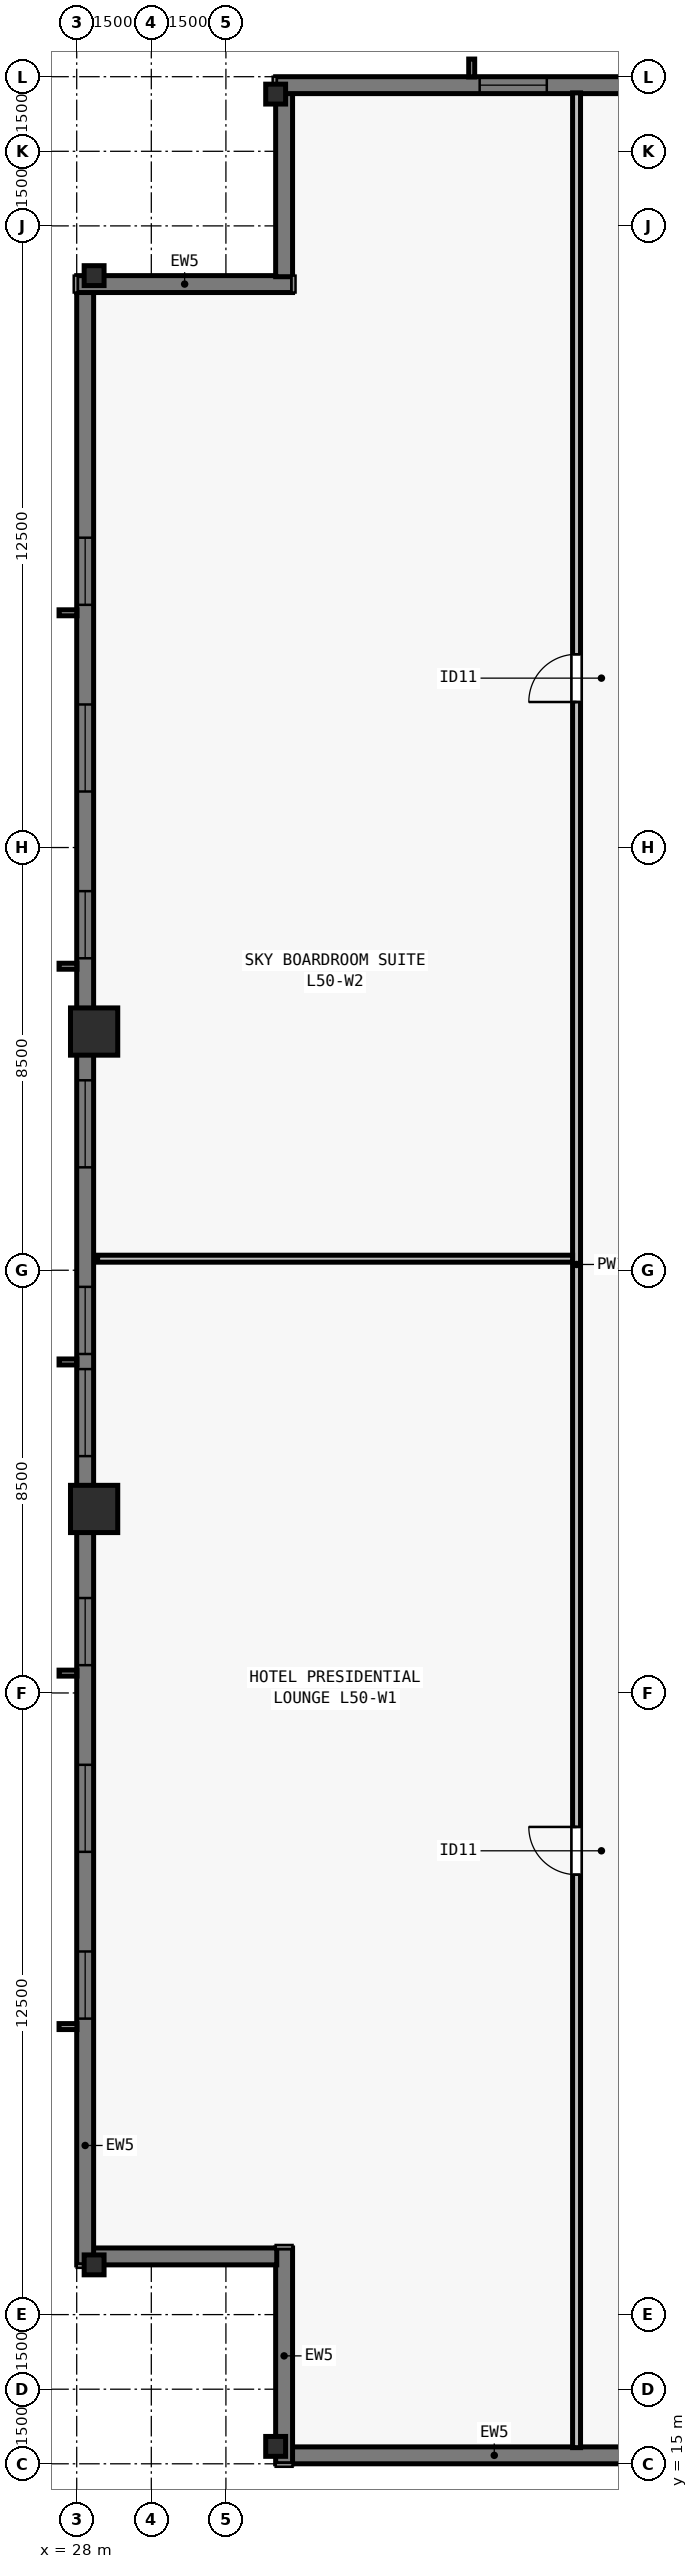
"""IFC4 building model, lengths in metres.
Left out: names, types, materials, properties, quantities, classifications, styles, units other than length and angle.
Written with IfcOpenShell. Run it as: python <this file> out.ifc"""

import sys

from ifc_helpers import new_model, si_unit, direction, frame, frame_2d, origin, origin_2d, place, context, subcontext, project, spatial, rectangle, i_section, extrude, element, fill, save


model = new_model("IFC4")
c1 = context("Model", 3, precision=1e-05, world=origin(), true_north=direction((0.0, 1.0)))
c2 = subcontext(c1, "Body", "Model", "MODEL_VIEW")
j1 = project(units=[si_unit("LENGTHUNIT", "METRE"), si_unit("PLANEANGLEUNIT", "RADIAN")], contexts=[c1])
p1 = place(None, origin())
s1 = spatial("IfcSite", under=j1, at=p1, CompositionType="ELEMENT")
p2 = place(p1, origin())
s2 = spatial("IfcBuilding", under=s1, at=p2, CompositionType="ELEMENT")
p3 = place(p2, frame((0.0, 0.0, 183.0)))
s3 = spatial("IfcBuildingStorey", under=s2, at=p3, CompositionType="ELEMENT", Elevation=183.0)
for number, where, z_axis, x_axis in (
    (1, (32.0, 15.35, 0.0), (0.0, 0.0, 1.0), (1.0, 0.0, 0.0)),
    (2, (32.0, 62.65, 0.0), (0.0, 0.0, 1.0), (1.0, 0.0, 0.0)),
    (3, (28.35, 59.0, 0.0), (0.0, 0.0, 1.0), (0.0, 1.0, 0.0)),
):
    element("IfcColumn", number, at=place(p3, frame(where, z_axis=z_axis, x_axis=x_axis)), inside=s3, PredefinedType="COLUMN", context=c2, shape_type="SweptSolid", body=[
        extrude(i_section(OverallWidth=0.4, OverallDepth=0.4, WebThickness=0.022, FlangeThickness=0.036, at=origin_2d()), origin(), (0.0, 0.0, 1.0), 3.5),
    ])
for number, where, z_axis, x_axis in (
    (4, (28.35, 43.8, 0.0), (0.0, 0.0, 1.0), (0.0, 1.0, 0.0)),
    (5, (28.35, 34.2, 0.0), (0.0, 0.0, 1.0), (0.0, 1.0, 0.0)),
):
    element("IfcColumn", number, at=place(p3, frame(where, z_axis=z_axis, x_axis=x_axis)), inside=s3, PredefinedType="COLUMN", context=c2, shape_type="SweptSolid", body=[
        extrude(rectangle(XDim=0.95, YDim=0.95, at=origin_2d()), origin(), (0.0, 0.0, 1.0), 3.5),
    ])
p4 = place(p3, frame((28.35, 19.0, 0.0), z_axis=(0.0, 0.0, 1.0), x_axis=(0.0, 1.0, 0.0)))
e6 = element("IfcColumn", 6, at=p4, inside=s3, PredefinedType="COLUMN", context=c2, shape_type="SweptSolid", body=[
    extrude(i_section(OverallWidth=0.4, OverallDepth=0.4, WebThickness=0.022, FlangeThickness=0.036, at=origin_2d()), origin(), (0.0, 0.0, 1.0), 3.5),
])
p5 = place(p3, frame((72.0, 15.17, 0.0), z_axis=(0.0, 0.0, 1.0), x_axis=(-1.0, 0.0, 0.0)))
e7 = element("IfcWall", 7, at=p5, inside=s3, PredefinedType="SOLIDWALL", context=c2, shape_type="SweptSolid", body=[
    extrude(rectangle(XDim=39.682, YDim=0.34, at=frame_2d((19.841, 0.0))), origin(), (0.0, 0.0, 1.0), 3.28),
])
p6 = place(p5, frame((5.802, 0.0, 0.8)))
e8 = element("IfcOpeningElement", 8, at=p6, cuts=e7, PredefinedType="OPENING", context=c2, shape_type="SweptSolid", body=[
    extrude(rectangle(XDim=1.35, YDim=1.66, at=frame_2d((0.675, 0.83))), frame((0.0, 0.18, 0.0), z_axis=(0.0, -1.0, 0.0), x_axis=(1.0, 0.0, 0.0)), (0.0, 0.0, 1.0), 0.36),
])
p7 = place(p5, frame((12.059, 0.0, 0.8)))
e9 = element("IfcOpeningElement", 9, at=p7, cuts=e7, PredefinedType="OPENING", context=c2, shape_type="SweptSolid", body=[
    extrude(rectangle(XDim=1.35, YDim=1.66, at=frame_2d((0.675, 0.83))), frame((0.0, 0.18, 0.0), z_axis=(0.0, -1.0, 0.0), x_axis=(1.0, 0.0, 0.0)), (0.0, 0.0, 1.0), 0.36),
])
p8 = place(p5, frame((19.166, 0.0, 0.8)))
e10 = element("IfcOpeningElement", 10, at=p8, cuts=e7, PredefinedType="OPENING", context=c2, shape_type="SweptSolid", body=[
    extrude(rectangle(XDim=1.35, YDim=1.66, at=frame_2d((0.675, 0.83))), frame((0.0, 0.18, 0.0), z_axis=(0.0, -1.0, 0.0), x_axis=(1.0, 0.0, 0.0)), (0.0, 0.0, 1.0), 0.36),
])
p9 = place(p5, frame((21.67, 0.0, 0.8)))
e11 = element("IfcOpeningElement", 11, at=p9, cuts=e7, PredefinedType="OPENING", context=c2, shape_type="SweptSolid", body=[
    extrude(rectangle(XDim=1.75, YDim=1.66, at=frame_2d((0.875, 0.83))), frame((0.0, 0.18, 0.0), z_axis=(0.0, -1.0, 0.0), x_axis=(1.0, 0.0, 0.0)), (0.0, 0.0, 1.0), 0.36),
])
p10 = place(p5, frame((26.273, 0.0, 0.8)))
e12 = element("IfcOpeningElement", 12, at=p10, cuts=e7, PredefinedType="OPENING", context=c2, shape_type="SweptSolid", body=[
    extrude(rectangle(XDim=1.35, YDim=1.66, at=frame_2d((0.675, 0.83))), frame((0.0, 0.18, 0.0), z_axis=(0.0, -1.0, 0.0), x_axis=(1.0, 0.0, 0.0)), (0.0, 0.0, 1.0), 0.36),
])
p11 = place(p5, frame((29.627, 0.0, 0.8)))
e13 = element("IfcOpeningElement", 13, at=p11, cuts=e7, PredefinedType="OPENING", context=c2, shape_type="SweptSolid", body=[
    extrude(rectangle(XDim=1.75, YDim=1.66, at=frame_2d((0.875, 0.83))), frame((0.0, 0.18, 0.0), z_axis=(0.0, -1.0, 0.0), x_axis=(1.0, 0.0, 0.0)), (0.0, 0.0, 1.0), 0.36),
])
p12 = place(p3, frame((32.17, 15.0, 0.0), z_axis=(0.0, 0.0, 1.0), x_axis=(0.0, 1.0, 0.0)))
e14 = element("IfcWall", 14, at=p12, inside=s3, PredefinedType="SOLIDWALL", context=c2, shape_type="SweptSolid", body=[
    extrude(rectangle(XDim=4.34, YDim=0.34, at=frame_2d((2.17, 0.0))), origin(), (0.0, 0.0, 1.0), 3.28),
])
p13 = place(p3, frame((32.022, 19.17, 0.0), z_axis=(0.0, 0.0, 1.0), x_axis=(-1.0, 0.0, 0.0)))
e15 = element("IfcWall", 15, at=p13, inside=s3, PredefinedType="SOLIDWALL", context=c2, shape_type="SweptSolid", body=[
    extrude(rectangle(XDim=3.704, YDim=0.34, at=frame_2d((1.852, 0.0))), origin(), (0.0, 0.0, 1.0), 3.28),
])
p14 = place(p3, frame((28.17, 19.0, 0.0), z_axis=(0.0, 0.0, 1.0), x_axis=(0.0, 1.0, 0.0)))
e16 = element("IfcWall", 16, at=p14, inside=s3, PredefinedType="SOLIDWALL", context=c2, shape_type="SweptSolid", body=[
    extrude(rectangle(XDim=39.682, YDim=0.34, at=frame_2d((19.841, 0.0))), origin(), (0.0, 0.0, 1.0), 3.28),
])
p15 = place(p14, frame((4.952, 0.0, 0.8)))
e17 = element("IfcOpeningElement", 17, at=p15, cuts=e16, PredefinedType="OPENING", context=c2, shape_type="SweptSolid", body=[
    extrude(rectangle(XDim=1.35, YDim=1.66, at=frame_2d((0.675, 0.83))), frame((0.0, 0.18, 0.0), z_axis=(0.0, -1.0, 0.0), x_axis=(1.0, 0.0, 0.0)), (0.0, 0.0, 1.0), 0.36),
])
p16 = place(p14, frame((8.305, 0.0, 0.8)))
e18 = element("IfcOpeningElement", 18, at=p16, cuts=e16, PredefinedType="OPENING", context=c2, shape_type="SweptSolid", body=[
    extrude(rectangle(XDim=1.75, YDim=1.66, at=frame_2d((0.875, 0.83))), frame((0.0, 0.18, 0.0), z_axis=(0.0, -1.0, 0.0), x_axis=(1.0, 0.0, 0.0)), (0.0, 0.0, 1.0), 0.36),
])
p17 = place(p14, frame((12.059, 0.0, 0.8)))
e19 = element("IfcOpeningElement", 19, at=p17, cuts=e16, PredefinedType="OPENING", context=c2, shape_type="SweptSolid", body=[
    extrude(rectangle(XDim=1.35, YDim=1.66, at=frame_2d((0.675, 0.83))), frame((0.0, 0.18, 0.0), z_axis=(0.0, -1.0, 0.0), x_axis=(1.0, 0.0, 0.0)), (0.0, 0.0, 1.0), 0.36),
])
p18 = place(p14, frame((16.262, 0.0, 0.8)))
e20 = element("IfcOpeningElement", 20, at=p18, cuts=e16, PredefinedType="OPENING", context=c2, shape_type="SweptSolid", body=[
    extrude(rectangle(XDim=1.75, YDim=1.66, at=frame_2d((0.875, 0.83))), frame((0.0, 0.18, 0.0), z_axis=(0.0, -1.0, 0.0), x_axis=(1.0, 0.0, 0.0)), (0.0, 0.0, 1.0), 0.36),
])
p19 = place(p14, frame((18.316, 0.0, 0.8)))
e21 = element("IfcOpeningElement", 21, at=p19, cuts=e16, PredefinedType="OPENING", context=c2, shape_type="SweptSolid", body=[
    extrude(rectangle(XDim=1.35, YDim=1.66, at=frame_2d((0.675, 0.83))), frame((0.0, 0.18, 0.0), z_axis=(0.0, -1.0, 0.0), x_axis=(1.0, 0.0, 0.0)), (0.0, 0.0, 1.0), 0.36),
])
p20 = place(p14, frame((22.07, 0.0, 0.8)))
e22 = element("IfcOpeningElement", 22, at=p20, cuts=e16, PredefinedType="OPENING", context=c2, shape_type="SweptSolid", body=[
    extrude(rectangle(XDim=1.75, YDim=1.66, at=frame_2d((0.875, 0.83))), frame((0.0, 0.18, 0.0), z_axis=(0.0, -1.0, 0.0), x_axis=(1.0, 0.0, 0.0)), (0.0, 0.0, 1.0), 0.36),
])
p21 = place(p14, frame((26.273, 0.0, 0.8)))
e23 = element("IfcOpeningElement", 23, at=p21, cuts=e16, PredefinedType="OPENING", context=c2, shape_type="SweptSolid", body=[
    extrude(rectangle(XDim=1.35, YDim=1.66, at=frame_2d((0.675, 0.83))), frame((0.0, 0.18, 0.0), z_axis=(0.0, -1.0, 0.0), x_axis=(1.0, 0.0, 0.0)), (0.0, 0.0, 1.0), 0.36),
])
p22 = place(p14, frame((29.627, 0.0, 0.8)))
e24 = element("IfcOpeningElement", 24, at=p22, cuts=e16, PredefinedType="OPENING", context=c2, shape_type="SweptSolid", body=[
    extrude(rectangle(XDim=1.75, YDim=1.66, at=frame_2d((0.875, 0.83))), frame((0.0, 0.18, 0.0), z_axis=(0.0, -1.0, 0.0), x_axis=(1.0, 0.0, 0.0)), (0.0, 0.0, 1.0), 0.36),
])
p23 = place(p14, frame((33.38, 0.0, 0.8)))
e25 = element("IfcOpeningElement", 25, at=p23, cuts=e16, PredefinedType="OPENING", context=c2, shape_type="SweptSolid", body=[
    extrude(rectangle(XDim=1.35, YDim=1.66, at=frame_2d((0.675, 0.83))), frame((0.0, 0.18, 0.0), z_axis=(0.0, -1.0, 0.0), x_axis=(1.0, 0.0, 0.0)), (0.0, 0.0, 1.0), 0.36),
])
p24 = place(p3, frame((28.0, 58.83, 0.0), z_axis=(0.0, 0.0, 1.0), x_axis=(1.0, 0.0, 0.0)))
e26 = element("IfcWall", 26, at=p24, inside=s3, PredefinedType="SOLIDWALL", context=c2, shape_type="SweptSolid", body=[
    extrude(rectangle(XDim=4.34, YDim=0.34, at=frame_2d((2.17, 0.0))), origin(), (0.0, 0.0, 1.0), 3.28),
])
p25 = place(p3, frame((32.17, 58.978, 0.0), z_axis=(0.0, 0.0, 1.0), x_axis=(0.0, 1.0, 0.0)))
e27 = element("IfcWall", 27, at=p25, inside=s3, PredefinedType="SOLIDWALL", context=c2, shape_type="SweptSolid", body=[
    extrude(rectangle(XDim=3.704, YDim=0.34, at=frame_2d((1.852, 0.0))), origin(), (0.0, 0.0, 1.0), 3.28),
])
p26 = place(p3, frame((32.0, 62.83, 0.0), z_axis=(0.0, 0.0, 1.0), x_axis=(1.0, 0.0, 0.0)))
e28 = element("IfcWall", 28, at=p26, inside=s3, PredefinedType="SOLIDWALL", context=c2, shape_type="SweptSolid", body=[
    extrude(rectangle(XDim=39.682, YDim=0.34, at=frame_2d((19.841, 0.0))), origin(), (0.0, 0.0, 1.0), 3.28),
])
p27 = place(p26, frame((4.102, 0.0, 0.8)))
e29 = element("IfcOpeningElement", 29, at=p27, cuts=e28, PredefinedType="OPENING", context=c2, shape_type="SweptSolid", body=[
    extrude(rectangle(XDim=1.35, YDim=1.66, at=frame_2d((0.675, 0.83))), frame((0.0, 0.18, 0.0), z_axis=(0.0, -1.0, 0.0), x_axis=(1.0, 0.0, 0.0)), (0.0, 0.0, 1.0), 0.36),
])
p28 = place(p26, frame((8.755, 0.0, 0.8)))
e30 = element("IfcOpeningElement", 30, at=p28, cuts=e28, PredefinedType="OPENING", context=c2, shape_type="SweptSolid", body=[
    extrude(rectangle(XDim=1.75, YDim=1.66, at=frame_2d((0.875, 0.83))), frame((0.0, 0.18, 0.0), z_axis=(0.0, -1.0, 0.0), x_axis=(1.0, 0.0, 0.0)), (0.0, 0.0, 1.0), 0.36),
])
p29 = place(p26, frame((12.059, 0.0, 0.8)))
e31 = element("IfcOpeningElement", 31, at=p29, cuts=e28, PredefinedType="OPENING", context=c2, shape_type="SweptSolid", body=[
    extrude(rectangle(XDim=1.35, YDim=1.66, at=frame_2d((0.675, 0.83))), frame((0.0, 0.18, 0.0), z_axis=(0.0, -1.0, 0.0), x_axis=(1.0, 0.0, 0.0)), (0.0, 0.0, 1.0), 0.36),
])
p30 = place(p26, frame((16.262, 0.0, 0.8)))
e32 = element("IfcOpeningElement", 32, at=p30, cuts=e28, PredefinedType="OPENING", context=c2, shape_type="SweptSolid", body=[
    extrude(rectangle(XDim=1.75, YDim=1.66, at=frame_2d((0.875, 0.83))), frame((0.0, 0.18, 0.0), z_axis=(0.0, -1.0, 0.0), x_axis=(1.0, 0.0, 0.0)), (0.0, 0.0, 1.0), 0.36),
])
p31 = place(p26, frame((18.316, 0.0, 0.8)))
e33 = element("IfcOpeningElement", 33, at=p31, cuts=e28, PredefinedType="OPENING", context=c2, shape_type="SweptSolid", body=[
    extrude(rectangle(XDim=1.35, YDim=1.66, at=frame_2d((0.675, 0.83))), frame((0.0, 0.18, 0.0), z_axis=(0.0, -1.0, 0.0), x_axis=(1.0, 0.0, 0.0)), (0.0, 0.0, 1.0), 0.36),
])
p32 = place(p26, frame((22.07, 0.0, 0.8)))
e34 = element("IfcOpeningElement", 34, at=p32, cuts=e28, PredefinedType="OPENING", context=c2, shape_type="SweptSolid", body=[
    extrude(rectangle(XDim=1.75, YDim=1.66, at=frame_2d((0.875, 0.83))), frame((0.0, 0.18, 0.0), z_axis=(0.0, -1.0, 0.0), x_axis=(1.0, 0.0, 0.0)), (0.0, 0.0, 1.0), 0.36),
])
p33 = place(p26, frame((26.273, 0.0, 0.8)))
e35 = element("IfcOpeningElement", 35, at=p33, cuts=e28, PredefinedType="OPENING", context=c2, shape_type="SweptSolid", body=[
    extrude(rectangle(XDim=1.35, YDim=1.66, at=frame_2d((0.675, 0.83))), frame((0.0, 0.18, 0.0), z_axis=(0.0, -1.0, 0.0), x_axis=(1.0, 0.0, 0.0)), (0.0, 0.0, 1.0), 0.36),
])
p34 = place(p26, frame((33.38, 0.0, 0.8)))
e36 = element("IfcOpeningElement", 36, at=p34, cuts=e28, PredefinedType="OPENING", context=c2, shape_type="SweptSolid", body=[
    extrude(rectangle(XDim=1.35, YDim=1.66, at=frame_2d((0.675, 0.83))), frame((0.0, 0.18, 0.0), z_axis=(0.0, -1.0, 0.0), x_axis=(1.0, 0.0, 0.0)), (0.0, 0.0, 1.0), 0.36),
])
p35 = place(p3, frame((38.05, 15.325, 0.0), z_axis=(0.0, 0.0, 1.0), x_axis=(0.0, 1.0, 0.0)))
e37 = element("IfcWall", 37, at=p35, inside=s3, PredefinedType="PARTITIONING", context=c2, shape_type="SweptSolid", body=[
    extrude(rectangle(XDim=47.35, YDim=0.16, at=frame_2d((23.675, 0.0))), origin(), (0.0, 0.0, 1.0), 2.555),
])
p36 = place(p35, frame((11.521, 0.0, 0.0)))
e38 = element("IfcOpeningElement", 38, at=p36, cuts=e37, PredefinedType="OPENING", context=c2, shape_type="SweptSolid", body=[
    extrude(rectangle(XDim=0.96, YDim=2.12, at=frame_2d((0.48, 1.06))), frame((0.0, 0.09, 0.0), z_axis=(0.0, -1.0, 0.0), x_axis=(1.0, 0.0, 0.0)), (0.0, 0.0, 1.0), 0.18),
])
p37 = place(p35, frame((35.101, 0.0, 0.0)))
e39 = element("IfcOpeningElement", 39, at=p37, cuts=e37, PredefinedType="OPENING", context=c2, shape_type="SweptSolid", body=[
    extrude(rectangle(XDim=0.96, YDim=2.12, at=frame_2d((0.48, 1.06))), frame((0.0, 0.09, 0.0), z_axis=(0.0, -1.0, 0.0), x_axis=(1.0, 0.0, 0.0)), (0.0, 0.0, 1.0), 0.18),
])
p38 = place(p3, frame((28.42, 39.232, 0.0), z_axis=(0.0, 0.0, 1.0), x_axis=(1.0, 0.0, 0.0)))
e40 = element("IfcWall", 40, at=p38, inside=s3, PredefinedType="PARTITIONING", context=c2, shape_type="SweptSolid", body=[
    extrude(rectangle(XDim=9.55, YDim=0.14, at=frame_2d((4.775, 0.0))), origin(), (0.0, 0.0, 1.0), 2.896),
])
p39 = place(p15, origin())
e41 = element("IfcWindow", 41, at=p39, inside=s3, PartitioningType="SINGLE_PANEL", PredefinedType="WINDOW", context=c2, shape_type="SweptSolid", body=[
    extrude(rectangle(XDim=1.35, YDim=1.66, at=frame_2d((0.675, 0.83))), frame((0.0, -0.05, 0.0), z_axis=(0.0, -1.0, 0.0), x_axis=(1.0, 0.0, 0.0)), (0.0, 0.0, 1.0), 0.06),
])
fill(e17, e41)
p40 = place(p16, origin())
e42 = element("IfcWindow", 42, at=p40, inside=s3, PartitioningType="SINGLE_PANEL", PredefinedType="WINDOW", context=c2, shape_type="SweptSolid", body=[
    extrude(rectangle(XDim=1.75, YDim=1.66, at=frame_2d((0.875, 0.83))), frame((0.0, -0.05, 0.0), z_axis=(0.0, -1.0, 0.0), x_axis=(1.0, 0.0, 0.0)), (0.0, 0.0, 1.0), 0.06),
])
fill(e18, e42)
p41 = place(p17, origin())
e43 = element("IfcWindow", 43, at=p41, inside=s3, PartitioningType="SINGLE_PANEL", PredefinedType="WINDOW", context=c2, shape_type="SweptSolid", body=[
    extrude(rectangle(XDim=1.35, YDim=1.66, at=frame_2d((0.675, 0.83))), frame((0.0, -0.05, 0.0), z_axis=(0.0, -1.0, 0.0), x_axis=(1.0, 0.0, 0.0)), (0.0, 0.0, 1.0), 0.06),
])
fill(e19, e43)
p42 = place(p18, origin())
e44 = element("IfcWindow", 44, at=p42, inside=s3, PartitioningType="SINGLE_PANEL", PredefinedType="WINDOW", context=c2, shape_type="SweptSolid", body=[
    extrude(rectangle(XDim=1.75, YDim=1.66, at=frame_2d((0.875, 0.83))), frame((0.0, -0.05, 0.0), z_axis=(0.0, -1.0, 0.0), x_axis=(1.0, 0.0, 0.0)), (0.0, 0.0, 1.0), 0.06),
])
fill(e20, e44)
p43 = place(p19, origin())
e45 = element("IfcWindow", 45, at=p43, inside=s3, PartitioningType="SINGLE_PANEL", PredefinedType="WINDOW", context=c2, shape_type="SweptSolid", body=[
    extrude(rectangle(XDim=1.35, YDim=1.66, at=frame_2d((0.675, 0.83))), frame((0.0, -0.05, 0.0), z_axis=(0.0, -1.0, 0.0), x_axis=(1.0, 0.0, 0.0)), (0.0, 0.0, 1.0), 0.06),
])
fill(e21, e45)
p44 = place(p20, origin())
e46 = element("IfcWindow", 46, at=p44, inside=s3, PartitioningType="SINGLE_PANEL", PredefinedType="WINDOW", context=c2, shape_type="SweptSolid", body=[
    extrude(rectangle(XDim=1.75, YDim=1.66, at=frame_2d((0.875, 0.83))), frame((0.0, -0.05, 0.0), z_axis=(0.0, -1.0, 0.0), x_axis=(1.0, 0.0, 0.0)), (0.0, 0.0, 1.0), 0.06),
])
fill(e22, e46)
p45 = place(p21, origin())
e47 = element("IfcWindow", 47, at=p45, inside=s3, PartitioningType="SINGLE_PANEL", PredefinedType="WINDOW", context=c2, shape_type="SweptSolid", body=[
    extrude(rectangle(XDim=1.35, YDim=1.66, at=frame_2d((0.675, 0.83))), frame((0.0, -0.05, 0.0), z_axis=(0.0, -1.0, 0.0), x_axis=(1.0, 0.0, 0.0)), (0.0, 0.0, 1.0), 0.06),
])
fill(e23, e47)
p46 = place(p22, origin())
e48 = element("IfcWindow", 48, at=p46, inside=s3, PartitioningType="SINGLE_PANEL", PredefinedType="WINDOW", context=c2, shape_type="SweptSolid", body=[
    extrude(rectangle(XDim=1.75, YDim=1.66, at=frame_2d((0.875, 0.83))), frame((0.0, -0.05, 0.0), z_axis=(0.0, -1.0, 0.0), x_axis=(1.0, 0.0, 0.0)), (0.0, 0.0, 1.0), 0.06),
])
fill(e24, e48)
p47 = place(p23, origin())
e49 = element("IfcWindow", 49, at=p47, inside=s3, PartitioningType="SINGLE_PANEL", PredefinedType="WINDOW", context=c2, shape_type="SweptSolid", body=[
    extrude(rectangle(XDim=1.35, YDim=1.66, at=frame_2d((0.675, 0.83))), frame((0.0, -0.05, 0.0), z_axis=(0.0, -1.0, 0.0), x_axis=(1.0, 0.0, 0.0)), (0.0, 0.0, 1.0), 0.06),
])
fill(e25, e49)
p48 = place(p27, origin())
e50 = element("IfcWindow", 50, at=p48, inside=s3, PartitioningType="SINGLE_PANEL", PredefinedType="WINDOW", context=c2, shape_type="SweptSolid", body=[
    extrude(rectangle(XDim=1.35, YDim=1.66, at=frame_2d((0.675, 0.83))), frame((0.0, -0.05, 0.0), z_axis=(0.0, -1.0, 0.0), x_axis=(1.0, 0.0, 0.0)), (0.0, 0.0, 1.0), 0.06),
])
fill(e29, e50)
p49 = place(p36, origin())
e51 = element("IfcDoor", 51, at=p49, inside=s3, OperationType="SINGLE_SWING_RIGHT", PredefinedType="DOOR", context=c2, shape_type="SweptSolid", body=[
    extrude(rectangle(XDim=0.96, YDim=2.12, at=frame_2d((0.48, 1.06))), frame((0.0, 0.025, 0.0), z_axis=(0.0, -1.0, 0.0), x_axis=(1.0, 0.0, 0.0)), (0.0, 0.0, 1.0), 0.05),
])
fill(e38, e51)
p50 = place(p37, origin())
e52 = element("IfcDoor", 52, at=p50, inside=s3, OperationType="SINGLE_SWING_LEFT", PredefinedType="DOOR", context=c2, shape_type="SweptSolid", body=[
    extrude(rectangle(XDim=0.96, YDim=2.12, at=frame_2d((0.48, 1.06))), frame((0.0, 0.025, 0.0), z_axis=(0.0, -1.0, 0.0), x_axis=(1.0, 0.0, 0.0)), (0.0, 0.0, 1.0), 0.05),
])
fill(e39, e52)
save(model, sys.argv[1])
